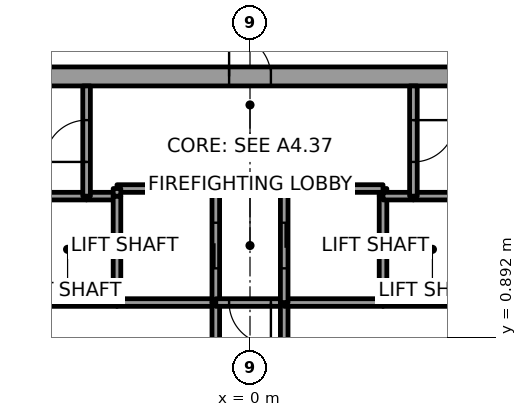
"""IFC4 building model, lengths in metres.
Left out: names, types, materials, properties, quantities, classifications, styles, units other than length and angle.
Written with IfcOpenShell. Run it as: python <this file> out.ifc"""

import sys

from ifc_helpers import new_model, si_unit, direction, frame, frame_2d, origin, place, context, subcontext, project, spatial, rectangle, extrude, element, fill, save


model = new_model("IFC4")
c1 = context("Model", 3, precision=1e-05, world=origin(), true_north=direction((0.0, 1.0)))
c2 = subcontext(c1, "Body", "Model", "MODEL_VIEW")
j1 = project(units=[si_unit("LENGTHUNIT", "METRE"), si_unit("PLANEANGLEUNIT", "RADIAN")], contexts=[c1])
p1 = place(None, origin())
s1 = spatial("IfcSite", under=j1, at=p1, CompositionType="ELEMENT")
p2 = place(p1, origin())
s2 = spatial("IfcBuilding", under=s1, at=p2, CompositionType="ELEMENT")
p3 = place(p2, frame((0.0, 0.0, 161.8)))
s3 = spatial("IfcBuildingStorey", under=s2, at=p3, CompositionType="ELEMENT", Elevation=161.8)
p4 = place(p3, frame((-11.0, 7.75, 0.0), z_axis=(0.0, 0.0, 1.0), x_axis=(1.0, 0.0, 0.0)))
e1 = element("IfcWall", 1, at=p4, inside=s3, PredefinedType="SHEAR", context=c2, shape_type="SweptSolid", body=[
    extrude(rectangle(XDim=22.0, YDim=0.5, at=frame_2d((11.0, 0.0))), origin(), (0.0, 0.0, 1.0), 4.0),
])
p5 = place(p4, frame((10.45, 0.0, 0.0)))
e2 = element("IfcOpeningElement", 2, at=p5, cuts=e1, PredefinedType="OPENING", context=c2, shape_type="SweptSolid", body=[
    extrude(rectangle(XDim=1.1, YDim=2.1, at=frame_2d((0.55, 1.05))), frame((0.0, 0.25, 0.0), z_axis=(0.0, -1.0, 0.0), x_axis=(1.0, 0.0, 0.0)), (0.0, 0.0, 1.0), 0.5),
])
p6 = place(p3, frame((-3.5, 1.8, 0.0), z_axis=(0.0, 0.0, 1.0), x_axis=(-1.0, 0.0, 0.0)))
e3 = element("IfcWall", 3, at=p6, inside=s3, PredefinedType="SOLIDWALL", context=c2, shape_type="SweptSolid", body=[
    extrude(rectangle(XDim=2.6, YDim=0.2, at=frame_2d((1.3, 0.0))), origin(), (0.0, 0.0, 1.0), 3.85),
])
p7 = place(p3, frame((-4.3, 4.6, 0.0), z_axis=(0.0, 0.0, 1.0), x_axis=(-1.0, 0.0, 0.0)))
e4 = element("IfcWall", 4, at=p7, inside=s3, PredefinedType="SOLIDWALL", context=c2, shape_type="SweptSolid", body=[
    extrude(rectangle(XDim=1.8, YDim=0.2, at=frame_2d((0.9, 0.0))), origin(), (0.0, 0.0, 1.0), 3.85),
])
p8 = place(p3, frame((-3.5, 4.6, 0.0), z_axis=(0.0, 0.0, 1.0), x_axis=(-1.0, 0.0, 0.0)))
e5 = element("IfcWall", 5, at=p8, inside=s3, PredefinedType="SOLIDWALL", context=c2, shape_type="SweptSolid", body=[
    extrude(rectangle(XDim=0.8, YDim=0.2, at=frame_2d((0.4, 0.0))), origin(), (0.0, 0.0, 1.0), 3.85),
])
p9 = place(p3, frame((-4.3, 4.6, 0.0), z_axis=(0.0, 0.0, 1.0), x_axis=(0.0, 1.0, 0.0)))
e6 = element("IfcWall", 6, at=p9, inside=s3, PredefinedType="SOLIDWALL", context=c2, shape_type="SweptSolid", body=[
    extrude(rectangle(XDim=2.9, YDim=0.2, at=frame_2d((1.45, 0.0))), origin(), (0.0, 0.0, 1.0), 3.85),
])
p10 = place(p9, frame((0.9, 0.0, 0.0)))
e7 = element("IfcOpeningElement", 7, at=p10, cuts=e6, PredefinedType="OPENING", context=c2, shape_type="SweptSolid", body=[
    extrude(rectangle(XDim=1.1, YDim=2.1, at=frame_2d((0.55, 1.05))), frame((0.0, 0.1, 0.0), z_axis=(0.0, -1.0, 0.0), x_axis=(1.0, 0.0, 0.0)), (0.0, 0.0, 1.0), 0.2),
])
p11 = place(p3, frame((-0.9, 1.8, 0.0), z_axis=(0.0, 0.0, 1.0), x_axis=(-1.0, 0.0, 0.0)))
e8 = element("IfcWall", 8, at=p11, inside=s3, PredefinedType="SOLIDWALL", context=c2, shape_type="SweptSolid", body=[
    extrude(rectangle(XDim=2.6, YDim=0.2, at=frame_2d((1.3, 0.0))), origin(), (0.0, 0.0, 1.0), 3.85),
])
p12 = place(p3, frame((-3.5, 4.6, 0.0), z_axis=(0.0, 0.0, 1.0), x_axis=(0.0, -1.0, 0.0)))
e9 = element("IfcWall", 9, at=p12, inside=s3, PredefinedType="SOLIDWALL", context=c2, shape_type="SweptSolid", body=[
    extrude(rectangle(XDim=2.8, YDim=0.2, at=frame_2d((1.4, 0.0))), origin(), (0.0, 0.0, 1.0), 3.85),
])
p13 = place(p3, frame((-0.9, 1.8, 0.0), z_axis=(0.0, 0.0, 1.0), x_axis=(0.0, 1.0, 0.0)))
e10 = element("IfcWall", 10, at=p13, inside=s3, PredefinedType="SOLIDWALL", context=c2, shape_type="SweptSolid", body=[
    extrude(rectangle(XDim=3.0, YDim=0.2, at=frame_2d((1.5, 0.0))), origin(), (0.0, 0.0, 1.0), 3.85),
])
p14 = place(p13, frame((0.9, 0.0, 0.0)))
e11 = element("IfcOpeningElement", 11, at=p14, cuts=e10, PredefinedType="OPENING", context=c2, shape_type="SweptSolid", body=[
    extrude(rectangle(XDim=1.2, YDim=2.1, at=frame_2d((0.6, 1.05))), frame((0.0, 0.1, 0.0), z_axis=(0.0, -1.0, 0.0), x_axis=(1.0, 0.0, 0.0)), (0.0, 0.0, 1.0), 0.2),
])
p15 = place(p3, frame((-0.9, 4.8, 0.0), z_axis=(0.0, 0.0, 1.0), x_axis=(-1.0, 0.0, 0.0)))
e12 = element("IfcWall", 12, at=p15, inside=s3, PredefinedType="SOLIDWALL", context=c2, shape_type="SweptSolid", body=[
    extrude(rectangle(XDim=2.6, YDim=0.2, at=frame_2d((1.3, 0.0))), origin(), (0.0, 0.0, 1.0), 3.85),
])
p16 = place(p3, frame((-3.5, 4.8, 0.0), z_axis=(0.0, 0.0, 1.0), x_axis=(0.0, -1.0, 0.0)))
e13 = element("IfcWall", 13, at=p16, inside=s3, PredefinedType="SOLIDWALL", context=c2, shape_type="SweptSolid", body=[
    extrude(rectangle(XDim=0.2, YDim=0.2, at=frame_2d((0.1, 0.0))), origin(), (0.0, 0.0, 1.0), 3.85),
])
p17 = place(p3, frame((-0.9, 1.8, 0.0), z_axis=(0.0, 0.0, 1.0), x_axis=(0.0, -1.0, 0.0)))
e14 = element("IfcWall", 14, at=p17, inside=s3, PredefinedType="SOLIDWALL", context=c2, shape_type="SweptSolid", body=[
    extrude(rectangle(XDim=3.6, YDim=0.2, at=frame_2d((1.8, 0.0))), origin(), (0.0, 0.0, 1.0), 3.85),
])
p18 = place(p17, frame((1.05, 0.0, 0.0)))
e15 = element("IfcOpeningElement", 15, at=p18, cuts=e14, PredefinedType="OPENING", context=c2, shape_type="SweptSolid", body=[
    extrude(rectangle(XDim=1.5, YDim=2.1, at=frame_2d((0.75, 1.05))), frame((0.0, 0.1, 0.0), z_axis=(0.0, -1.0, 0.0), x_axis=(1.0, 0.0, 0.0)), (0.0, 0.0, 1.0), 0.2),
])
p19 = place(p3, frame((0.9, 1.8, 0.0), z_axis=(0.0, 0.0, 1.0), x_axis=(-1.0, 0.0, 0.0)))
e16 = element("IfcWall", 16, at=p19, inside=s3, PredefinedType="SOLIDWALL", context=c2, shape_type="SweptSolid", body=[
    extrude(rectangle(XDim=1.8, YDim=0.2, at=frame_2d((0.9, 0.0))), origin(), (0.0, 0.0, 1.0), 3.85),
])
p20 = place(p19, frame((0.35, 0.0, 0.0)))
e17 = element("IfcOpeningElement", 17, at=p20, cuts=e16, PredefinedType="OPENING", context=c2, shape_type="SweptSolid", body=[
    extrude(rectangle(XDim=1.1, YDim=2.1, at=frame_2d((0.55, 1.05))), frame((0.0, 0.1, 0.0), z_axis=(0.0, -1.0, 0.0), x_axis=(1.0, 0.0, 0.0)), (0.0, 0.0, 1.0), 0.2),
])
p21 = place(p3, frame((0.9, -1.8, 0.0), z_axis=(0.0, 0.0, 1.0), x_axis=(0.0, 1.0, 0.0)))
e18 = element("IfcWall", 18, at=p21, inside=s3, PredefinedType="SOLIDWALL", context=c2, shape_type="SweptSolid", body=[
    extrude(rectangle(XDim=3.6, YDim=0.2, at=frame_2d((1.8, 0.0))), origin(), (0.0, 0.0, 1.0), 3.85),
])
p22 = place(p21, frame((1.05, 0.0, 0.0)))
e19 = element("IfcOpeningElement", 19, at=p22, cuts=e18, PredefinedType="OPENING", context=c2, shape_type="SweptSolid", body=[
    extrude(rectangle(XDim=1.5, YDim=2.1, at=frame_2d((0.75, 1.05))), frame((0.0, 0.1, 0.0), z_axis=(0.0, -1.0, 0.0), x_axis=(1.0, 0.0, 0.0)), (0.0, 0.0, 1.0), 0.2),
])
p23 = place(p3, frame((3.5, 1.8, 0.0), z_axis=(0.0, 0.0, 1.0), x_axis=(-1.0, 0.0, 0.0)))
e20 = element("IfcWall", 20, at=p23, inside=s3, PredefinedType="SOLIDWALL", context=c2, shape_type="SweptSolid", body=[
    extrude(rectangle(XDim=2.6, YDim=0.2, at=frame_2d((1.3, 0.0))), origin(), (0.0, 0.0, 1.0), 3.85),
])
p24 = place(p3, frame((3.5, 4.6, 0.0), z_axis=(0.0, 0.0, 1.0), x_axis=(0.0, 1.0, 0.0)))
e21 = element("IfcWall", 21, at=p24, inside=s3, PredefinedType="SOLIDWALL", context=c2, shape_type="SweptSolid", body=[
    extrude(rectangle(XDim=0.2, YDim=0.2, at=frame_2d((0.1, 0.0))), origin(), (0.0, 0.0, 1.0), 3.85),
])
p25 = place(p3, frame((3.5, 4.8, 0.0), z_axis=(0.0, 0.0, 1.0), x_axis=(-1.0, 0.0, 0.0)))
e22 = element("IfcWall", 22, at=p25, inside=s3, PredefinedType="SOLIDWALL", context=c2, shape_type="SweptSolid", body=[
    extrude(rectangle(XDim=2.6, YDim=0.2, at=frame_2d((1.3, 0.0))), origin(), (0.0, 0.0, 1.0), 3.85),
])
p26 = place(p3, frame((0.9, 4.8, 0.0), z_axis=(0.0, 0.0, 1.0), x_axis=(0.0, -1.0, 0.0)))
e23 = element("IfcWall", 23, at=p26, inside=s3, PredefinedType="SOLIDWALL", context=c2, shape_type="SweptSolid", body=[
    extrude(rectangle(XDim=3.0, YDim=0.2, at=frame_2d((1.5, 0.0))), origin(), (0.0, 0.0, 1.0), 3.85),
])
p27 = place(p26, frame((0.9, 0.0, 0.0)))
e24 = element("IfcOpeningElement", 24, at=p27, cuts=e23, PredefinedType="OPENING", context=c2, shape_type="SweptSolid", body=[
    extrude(rectangle(XDim=1.2, YDim=2.1, at=frame_2d((0.6, 1.05))), frame((0.0, 0.1, 0.0), z_axis=(0.0, -1.0, 0.0), x_axis=(1.0, 0.0, 0.0)), (0.0, 0.0, 1.0), 0.2),
])
p28 = place(p3, frame((6.1, 1.8, 0.0), z_axis=(0.0, 0.0, 1.0), x_axis=(-1.0, 0.0, 0.0)))
e25 = element("IfcWall", 25, at=p28, inside=s3, PredefinedType="SOLIDWALL", context=c2, shape_type="SweptSolid", body=[
    extrude(rectangle(XDim=2.6, YDim=0.2, at=frame_2d((1.3, 0.0))), origin(), (0.0, 0.0, 1.0), 3.85),
])
p29 = place(p3, frame((3.5, 1.8, 0.0), z_axis=(0.0, 0.0, 1.0), x_axis=(0.0, 1.0, 0.0)))
e26 = element("IfcWall", 26, at=p29, inside=s3, PredefinedType="SOLIDWALL", context=c2, shape_type="SweptSolid", body=[
    extrude(rectangle(XDim=2.8, YDim=0.2, at=frame_2d((1.4, 0.0))), origin(), (0.0, 0.0, 1.0), 3.85),
])
p30 = place(p3, frame((4.3, 4.6, 0.0), z_axis=(0.0, 0.0, 1.0), x_axis=(-1.0, 0.0, 0.0)))
e27 = element("IfcWall", 27, at=p30, inside=s3, PredefinedType="SOLIDWALL", context=c2, shape_type="SweptSolid", body=[
    extrude(rectangle(XDim=0.8, YDim=0.2, at=frame_2d((0.4, 0.0))), origin(), (0.0, 0.0, 1.0), 3.85),
])
p31 = place(p3, frame((6.1, 4.6, 0.0), z_axis=(0.0, 0.0, 1.0), x_axis=(-1.0, 0.0, 0.0)))
e28 = element("IfcWall", 28, at=p31, inside=s3, PredefinedType="SOLIDWALL", context=c2, shape_type="SweptSolid", body=[
    extrude(rectangle(XDim=1.8, YDim=0.2, at=frame_2d((0.9, 0.0))), origin(), (0.0, 0.0, 1.0), 3.85),
])
p32 = place(p3, frame((4.3, 7.5, 0.0), z_axis=(0.0, 0.0, 1.0), x_axis=(0.0, -1.0, 0.0)))
e29 = element("IfcWall", 29, at=p32, inside=s3, PredefinedType="SOLIDWALL", context=c2, shape_type="SweptSolid", body=[
    extrude(rectangle(XDim=2.9, YDim=0.2, at=frame_2d((1.45, 0.0))), origin(), (0.0, 0.0, 1.0), 3.85),
])
p33 = place(p32, frame((0.9, 0.0, 0.0)))
e30 = element("IfcOpeningElement", 30, at=p33, cuts=e29, PredefinedType="OPENING", context=c2, shape_type="SweptSolid", body=[
    extrude(rectangle(XDim=1.1, YDim=2.1, at=frame_2d((0.55, 1.05))), frame((0.0, 0.1, 0.0), z_axis=(0.0, -1.0, 0.0), x_axis=(1.0, 0.0, 0.0)), (0.0, 0.0, 1.0), 0.2),
])
p34 = place(p14, origin())
e31 = element("IfcDoor", 31, at=p34, inside=s3, OperationType="SLIDING_TO_RIGHT", PredefinedType="DOOR", context=c2, shape_type="SweptSolid", body=[
    extrude(rectangle(XDim=1.2, YDim=2.1, at=frame_2d((0.6, 1.05))), frame((0.0, 0.025, 0.0), z_axis=(0.0, -1.0, 0.0), x_axis=(1.0, 0.0, 0.0)), (0.0, 0.0, 1.0), 0.05),
])
fill(e11, e31)
p35 = place(p27, origin())
e32 = element("IfcDoor", 32, at=p35, inside=s3, OperationType="SLIDING_TO_RIGHT", PredefinedType="DOOR", context=c2, shape_type="SweptSolid", body=[
    extrude(rectangle(XDim=1.2, YDim=2.1, at=frame_2d((0.6, 1.05))), frame((0.0, 0.025, 0.0), z_axis=(0.0, -1.0, 0.0), x_axis=(1.0, 0.0, 0.0)), (0.0, 0.0, 1.0), 0.05),
])
fill(e24, e32)
p36 = place(p20, origin())
e33 = element("IfcDoor", 33, at=p36, inside=s3, OperationType="SINGLE_SWING_LEFT", PredefinedType="DOOR", context=c2, shape_type="SweptSolid", body=[
    extrude(rectangle(XDim=1.1, YDim=2.1, at=frame_2d((0.55, 1.05))), frame((0.0, 0.025, 0.0), z_axis=(0.0, -1.0, 0.0), x_axis=(1.0, 0.0, 0.0)), (0.0, 0.0, 1.0), 0.05),
])
fill(e17, e33)
p37 = place(p10, origin())
e34 = element("IfcDoor", 34, at=p37, inside=s3, OperationType="SINGLE_SWING_RIGHT", PredefinedType="DOOR", context=c2, shape_type="SweptSolid", body=[
    extrude(rectangle(XDim=1.1, YDim=2.1, at=frame_2d((0.55, 1.05))), frame((0.0, 0.025, 0.0), z_axis=(0.0, -1.0, 0.0), x_axis=(1.0, 0.0, 0.0)), (0.0, 0.0, 1.0), 0.05),
])
fill(e7, e34)
p38 = place(p33, origin())
e35 = element("IfcDoor", 35, at=p38, inside=s3, OperationType="SINGLE_SWING_LEFT", PredefinedType="DOOR", context=c2, shape_type="SweptSolid", body=[
    extrude(rectangle(XDim=1.1, YDim=2.1, at=frame_2d((0.55, 1.05))), frame((0.0, 0.025, 0.0), z_axis=(0.0, -1.0, 0.0), x_axis=(1.0, 0.0, 0.0)), (0.0, 0.0, 1.0), 0.05),
])
fill(e30, e35)
p39 = place(p5, origin())
e36 = element("IfcDoor", 36, at=p39, inside=s3, OperationType="SINGLE_SWING_LEFT", PredefinedType="DOOR", context=c2, shape_type="SweptSolid", body=[
    extrude(rectangle(XDim=1.1, YDim=2.1, at=frame_2d((0.55, 1.05))), frame((0.0, 0.025, 0.0), z_axis=(0.0, -1.0, 0.0), x_axis=(1.0, 0.0, 0.0)), (0.0, 0.0, 1.0), 0.05),
])
fill(e2, e36)
save(model, sys.argv[1])
